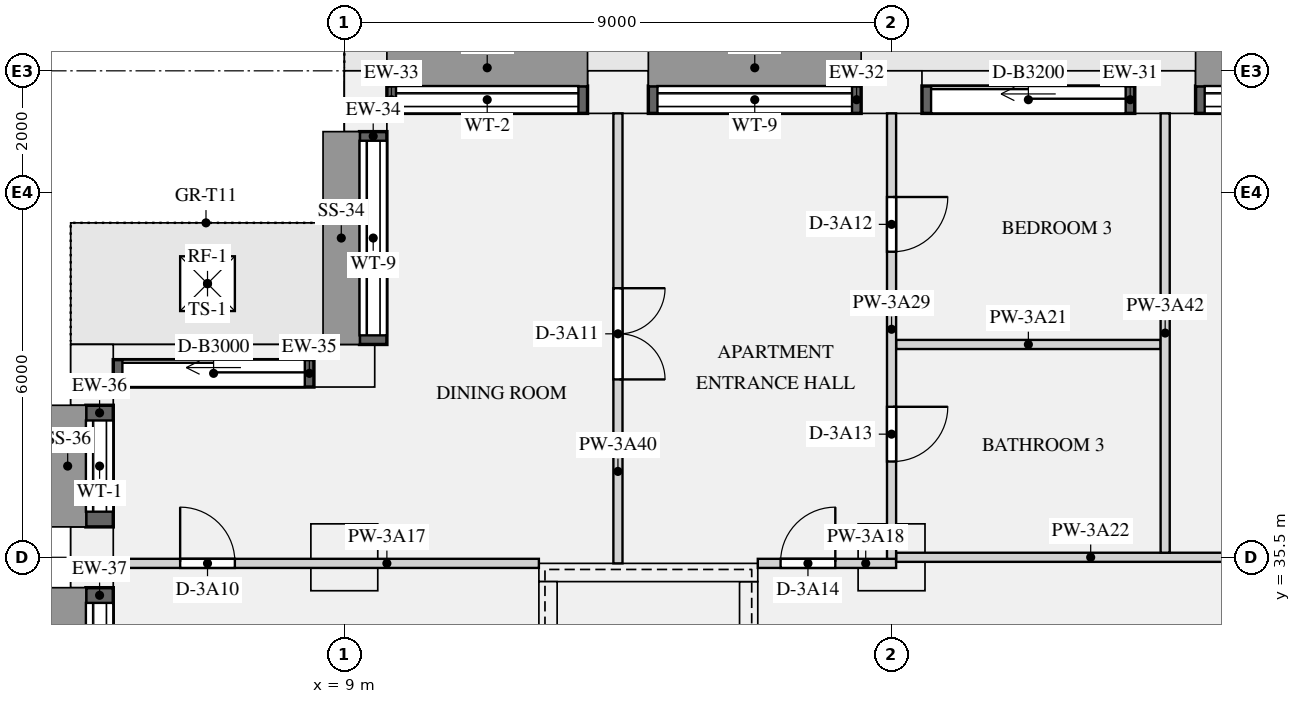
"""IFC4 building model, lengths in metres.
Left out: names, types, materials, properties, quantities, classifications, styles, units other than length and angle.
Written with IfcOpenShell. Run it as: python <this file> out.ifc"""

import sys

from ifc_helpers import new_model, si_unit, direction, frame, frame_2d, origin, origin_2d, place, context, subcontext, project, spatial, rectangle, extrude, element, fill, save


model = new_model("IFC4")
c1 = context("Model", 3, precision=1e-05, world=origin(), true_north=direction((0.0, 1.0)))
c2 = subcontext(c1, "Body", "Model", "MODEL_VIEW")
j1 = project(units=[si_unit("LENGTHUNIT", "METRE"), si_unit("PLANEANGLEUNIT", "RADIAN")], contexts=[c1])
p1 = place(None, origin())
s1 = spatial("IfcSite", under=j1, at=p1, CompositionType="ELEMENT")
p2 = place(p1, origin())
s2 = spatial("IfcBuilding", under=s1, at=p2, CompositionType="ELEMENT")
p3 = place(p2, frame((0.0, 0.0, 141.3)))
s3 = spatial("IfcBuildingStorey", under=s2, at=p3, CompositionType="ELEMENT", Elevation=141.3)
for number, where, z_axis, x_axis in (
    (1, (22.5, 43.15, 0.0), (0.0, 0.0, 1.0), (-1.0, 0.0, 0.0)),
    (2, (18.0, 43.15, 0.0), (0.0, 0.0, 1.0), (-1.0, 0.0, 0.0)),
    (3, (13.5, 43.15, 0.0), (0.0, 0.0, 1.0), (-1.0, 0.0, 0.0)),
    (4, (9.35, 43.0, 0.0), (0.0, 0.0, 1.0), (0.0, -1.0, 0.0)),
    (5, (9.0, 38.65, 0.0), (0.0, 0.0, 1.0), (-1.0, 0.0, 0.0)),
    (6, (4.85, 38.5, 0.0), (0.0, 0.0, 1.0), (0.0, -1.0, 0.0)),
    (7, (4.85, 35.5, 0.0), (0.0, 0.0, 1.0), (0.0, -1.0, 0.0)),
):
    element("IfcColumn", number, at=place(p3, frame(where, z_axis=z_axis, x_axis=x_axis)), inside=s3, PredefinedType="USERDEFINED", context=c2, shape_type="SweptSolid", body=[
        extrude(rectangle(XDim=1.0, YDim=0.7, at=origin_2d()), origin(), (0.0, 0.0, 1.0), 3.15),
    ])
for number, where, z_axis, x_axis in (
    (8, (9.0, 35.5, 0.0), (0.0, 0.0, 1.0), (1.0, 0.0, 0.0)),
    (9, (18.0, 35.5, 0.0), (0.0, 0.0, 1.0), (1.0, 0.0, 0.0)),
):
    element("IfcColumn", number, at=place(p3, frame(where, z_axis=z_axis, x_axis=x_axis)), inside=s3, PredefinedType="COLUMN", context=c2, shape_type="SweptSolid", body=[
        extrude(rectangle(XDim=1.1, YDim=1.1, at=origin_2d()), origin(), (0.0, 0.0, 1.0), 3.15),
    ])
p4 = place(p3, frame((12.2, 35.25, 0.0), z_axis=(0.0, 0.0, 1.0), x_axis=(1.0, 0.0, 0.0)))
e10 = element("IfcWall", 10, at=p4, inside=s3, PredefinedType="SHEAR", context=c2, shape_type="SweptSolid", body=[
    extrude(rectangle(XDim=3.6, YDim=0.3, at=frame_2d((1.8, 0.0))), origin(), (0.0, 0.0, 1.0), 3.15),
])
for number, where, z_axis, x_axis in (
    (11, (12.35, 27.3, 0.0), (0.0, 0.0, 1.0), (0.0, 1.0, 0.0)),
    (12, (15.65, 27.3, 0.0), (0.0, 0.0, 1.0), (0.0, 1.0, 0.0)),
):
    element("IfcWall", number, at=place(p3, frame(where, z_axis=z_axis, x_axis=x_axis)), inside=s3, PredefinedType="SHEAR", context=c2, shape_type="SweptSolid", body=[
        extrude(rectangle(XDim=7.8, YDim=0.3, at=frame_2d((3.9, 0.0))), origin(), (0.0, 0.0, 1.0), 3.15),
    ])
p5 = place(p3, frame((26.5, 43.025, 0.9), z_axis=(0.0, 0.0, 1.0), x_axis=(-1.0, 0.0, 0.0)))
e13 = element("IfcWall", 13, at=p5, inside=s3, PredefinedType="SOLIDWALL", context=c2, shape_type="SweptSolid", body=[
    extrude(rectangle(XDim=3.5, YDim=0.45, at=frame_2d((1.75, 0.0))), origin(), (0.0, 0.0, 1.0), 1.93),
])
p6 = place(p5, frame((0.15, 0.0, 0.15)))
e14 = element("IfcOpeningElement", 14, at=p6, cuts=e13, PredefinedType="OPENING", context=c2, shape_type="SweptSolid", body=[
    extrude(rectangle(XDim=3.2, YDim=1.5, at=frame_2d((1.6, 0.75))), frame((0.0, 0.235, 0.0), z_axis=(0.0, -1.0, 0.0), x_axis=(1.0, 0.0, 0.0)), (0.0, 0.0, 1.0), 0.47),
])
p7 = place(p3, frame((22.0, 43.025, 0.0), z_axis=(0.0, 0.0, 1.0), x_axis=(-1.0, 0.0, 0.0)))
e15 = element("IfcWall", 15, at=p7, inside=s3, PredefinedType="SOLIDWALL", context=c2, shape_type="SweptSolid", body=[
    extrude(rectangle(XDim=3.5, YDim=0.45, at=frame_2d((1.75, 0.0))), origin(), (0.0, 0.0, 1.0), 2.83),
])
p8 = place(p7, frame((0.15, 0.0, 0.0)))
e16 = element("IfcOpeningElement", 16, at=p8, cuts=e15, PredefinedType="OPENING", context=c2, shape_type="SweptSolid", body=[
    extrude(rectangle(XDim=3.2, YDim=2.3, at=frame_2d((1.6, 1.15))), frame((0.0, 0.235, 0.0), z_axis=(0.0, -1.0, 0.0), x_axis=(1.0, 0.0, 0.0)), (0.0, 0.0, 1.0), 0.47),
])
p9 = place(p3, frame((17.5, 43.025, 0.9), z_axis=(0.0, 0.0, 1.0), x_axis=(-1.0, 0.0, 0.0)))
e17 = element("IfcWall", 17, at=p9, inside=s3, PredefinedType="SOLIDWALL", context=c2, shape_type="SweptSolid", body=[
    extrude(rectangle(XDim=3.5, YDim=0.45, at=frame_2d((1.75, 0.0))), origin(), (0.0, 0.0, 1.0), 1.93),
])
p10 = place(p9, frame((0.15, 0.0, 0.15)))
e18 = element("IfcOpeningElement", 18, at=p10, cuts=e17, PredefinedType="OPENING", context=c2, shape_type="SweptSolid", body=[
    extrude(rectangle(XDim=3.2, YDim=1.5, at=frame_2d((1.6, 0.75))), frame((0.0, 0.235, 0.0), z_axis=(0.0, -1.0, 0.0), x_axis=(1.0, 0.0, 0.0)), (0.0, 0.0, 1.0), 0.47),
])
p11 = place(p3, frame((13.0, 43.025, 0.9), z_axis=(0.0, 0.0, 1.0), x_axis=(-1.0, 0.0, 0.0)))
e19 = element("IfcWall", 19, at=p11, inside=s3, PredefinedType="SOLIDWALL", context=c2, shape_type="SweptSolid", body=[
    extrude(rectangle(XDim=3.3, YDim=0.45, at=frame_2d((1.65, 0.0))), origin(), (0.0, 0.0, 1.0), 1.93),
])
p12 = place(p11, frame((0.15, 0.0, 0.15)))
e20 = element("IfcOpeningElement", 20, at=p12, cuts=e19, PredefinedType="OPENING", context=c2, shape_type="SweptSolid", body=[
    extrude(rectangle(XDim=3.0, YDim=1.5, at=frame_2d((1.5, 0.75))), frame((0.0, 0.235, 0.0), z_axis=(0.0, -1.0, 0.0), x_axis=(1.0, 0.0, 0.0)), (0.0, 0.0, 1.0), 0.47),
])
p13 = place(p3, frame((9.475, 42.5, 0.9), z_axis=(0.0, 0.0, 1.0), x_axis=(0.0, -1.0, 0.0)))
e21 = element("IfcWall", 21, at=p13, inside=s3, PredefinedType="SOLIDWALL", context=c2, shape_type="SweptSolid", body=[
    extrude(rectangle(XDim=3.5, YDim=0.45, at=frame_2d((1.75, 0.0))), origin(), (0.0, 0.0, 1.0), 1.93),
])
p14 = place(p13, frame((0.15, 0.0, 0.15)))
e22 = element("IfcOpeningElement", 22, at=p14, cuts=e21, PredefinedType="OPENING", context=c2, shape_type="SweptSolid", body=[
    extrude(rectangle(XDim=3.2, YDim=1.5, at=frame_2d((1.6, 0.75))), frame((0.0, 0.235, 0.0), z_axis=(0.0, -1.0, 0.0), x_axis=(1.0, 0.0, 0.0)), (0.0, 0.0, 1.0), 0.47),
])
p15 = place(p3, frame((8.5, 38.525, 0.0), z_axis=(0.0, 0.0, 1.0), x_axis=(-1.0, 0.0, 0.0)))
e23 = element("IfcWall", 23, at=p15, inside=s3, PredefinedType="SOLIDWALL", context=c2, shape_type="SweptSolid", body=[
    extrude(rectangle(XDim=3.3, YDim=0.45, at=frame_2d((1.65, 0.0))), origin(), (0.0, 0.0, 1.0), 2.83),
])
p16 = place(p15, frame((0.15, 0.0, 0.0)))
e24 = element("IfcOpeningElement", 24, at=p16, cuts=e23, PredefinedType="OPENING", context=c2, shape_type="SweptSolid", body=[
    extrude(rectangle(XDim=3.0, YDim=2.3, at=frame_2d((1.5, 1.15))), frame((0.0, 0.235, 0.0), z_axis=(0.0, -1.0, 0.0), x_axis=(1.0, 0.0, 0.0)), (0.0, 0.0, 1.0), 0.47),
])
p17 = place(p3, frame((4.975, 38.0, 0.9), z_axis=(0.0, 0.0, 1.0), x_axis=(0.0, -1.0, 0.0)))
e25 = element("IfcWall", 25, at=p17, inside=s3, PredefinedType="SOLIDWALL", context=c2, shape_type="SweptSolid", body=[
    extrude(rectangle(XDim=2.0, YDim=0.45, at=frame_2d((1.0, 0.0))), origin(), (0.0, 0.0, 1.0), 1.93),
])
p18 = place(p17, frame((0.25, 0.0, 0.15)))
e26 = element("IfcOpeningElement", 26, at=p18, cuts=e25, PredefinedType="OPENING", context=c2, shape_type="SweptSolid", body=[
    extrude(rectangle(XDim=1.5, YDim=1.5, at=frame_2d((0.75, 0.75))), frame((0.0, 0.235, 0.0), z_axis=(0.0, -1.0, 0.0), x_axis=(1.0, 0.0, 0.0)), (0.0, 0.0, 1.0), 0.47),
])
p19 = place(p3, frame((4.975, 35.0, 0.9), z_axis=(0.0, 0.0, 1.0), x_axis=(0.0, -1.0, 0.0)))
e27 = element("IfcWall", 27, at=p19, inside=s3, PredefinedType="SOLIDWALL", context=c2, shape_type="SweptSolid", body=[
    extrude(rectangle(XDim=2.5, YDim=0.45, at=frame_2d((1.25, 0.0))), origin(), (0.0, 0.0, 1.0), 1.93),
])
p20 = place(p19, frame((0.25, 0.0, 0.15)))
e28 = element("IfcOpeningElement", 28, at=p20, cuts=e27, PredefinedType="OPENING", context=c2, shape_type="SweptSolid", body=[
    extrude(rectangle(XDim=2.0, YDim=1.5, at=frame_2d((1.0, 0.75))), frame((0.0, 0.235, 0.0), z_axis=(0.0, -1.0, 0.0), x_axis=(1.0, 0.0, 0.0)), (0.0, 0.0, 1.0), 0.47),
])
p21 = place(p3, frame((5.2, 35.4, 0.0), z_axis=(0.0, 0.0, 1.0), x_axis=(1.0, 0.0, 0.0)))
e29 = element("IfcWall", 29, at=p21, inside=s3, PredefinedType="PARTITIONING", context=c2, shape_type="SweptSolid", body=[
    extrude(rectangle(XDim=7.0, YDim=0.15, at=frame_2d((3.5, 0.0))), origin(), (0.0, 0.0, 1.0), 2.83),
])
p22 = place(p21, frame((1.1, 0.0, 0.0)))
e30 = element("IfcOpeningElement", 30, at=p22, cuts=e29, PredefinedType="OPENING", context=c2, shape_type="SweptSolid", body=[
    extrude(rectangle(XDim=0.9, YDim=2.1, at=frame_2d((0.45, 1.05))), frame((0.0, 0.085, 0.0), z_axis=(0.0, -1.0, 0.0), x_axis=(1.0, 0.0, 0.0)), (0.0, 0.0, 1.0), 0.17),
])
p23 = place(p3, frame((15.8, 35.4, 0.0), z_axis=(0.0, 0.0, 1.0), x_axis=(1.0, 0.0, 0.0)))
e31 = element("IfcWall", 31, at=p23, inside=s3, PredefinedType="PARTITIONING", context=c2, shape_type="SweptSolid", body=[
    extrude(rectangle(XDim=2.275, YDim=0.15, at=frame_2d((1.137, 0.0))), origin(), (0.0, 0.0, 1.0), 2.83),
])
p24 = place(p23, frame((0.375, 0.0, 0.0)))
e32 = element("IfcOpeningElement", 32, at=p24, cuts=e31, PredefinedType="OPENING", context=c2, shape_type="SweptSolid", body=[
    extrude(rectangle(XDim=0.9, YDim=2.1, at=frame_2d((0.45, 1.05))), frame((0.0, 0.085, 0.0), z_axis=(0.0, -1.0, 0.0), x_axis=(1.0, 0.0, 0.0)), (0.0, 0.0, 1.0), 0.17),
])
p25 = place(p3, frame((18.075, 39.0, 0.0), z_axis=(0.0, 0.0, 1.0), x_axis=(1.0, 0.0, 0.0)))
e33 = element("IfcWall", 33, at=p25, inside=s3, PredefinedType="PARTITIONING", context=c2, shape_type="SweptSolid", body=[
    extrude(rectangle(XDim=4.35, YDim=0.15, at=frame_2d((2.175, 0.0))), origin(), (0.0, 0.0, 1.0), 2.83),
])
p26 = place(p3, frame((18.075, 35.5, 0.0), z_axis=(0.0, 0.0, 1.0), x_axis=(1.0, 0.0, 0.0)))
e34 = element("IfcWall", 34, at=p26, inside=s3, PredefinedType="PARTITIONING", context=c2, shape_type="SweptSolid", body=[
    extrude(rectangle(XDim=8.925, YDim=0.15, at=frame_2d((4.462, 0.0))), origin(), (0.0, 0.0, 1.0), 2.83),
])
p27 = place(p26, frame((6.4, 0.0, 0.0)))
e35 = element("IfcOpeningElement", 35, at=p27, cuts=e34, PredefinedType="OPENING", context=c2, shape_type="SweptSolid", body=[
    extrude(rectangle(XDim=1.5, YDim=2.1, at=frame_2d((0.75, 1.05))), frame((0.0, 0.085, 0.0), z_axis=(0.0, -1.0, 0.0), x_axis=(1.0, 0.0, 0.0)), (0.0, 0.0, 1.0), 0.17),
])
p28 = place(p3, frame((18.0, 35.475, 0.0), z_axis=(0.0, 0.0, 1.0), x_axis=(0.0, 1.0, 0.0)))
e36 = element("IfcWall", 36, at=p28, inside=s3, PredefinedType="PARTITIONING", context=c2, shape_type="SweptSolid", body=[
    extrude(rectangle(XDim=7.325, YDim=0.15, at=frame_2d((3.663, 0.0))), origin(), (0.0, 0.0, 1.0), 2.83),
])
p29 = place(p28, frame((5.05, 0.0, 0.0)))
e37 = element("IfcOpeningElement", 37, at=p29, cuts=e36, PredefinedType="OPENING", context=c2, shape_type="SweptSolid", body=[
    extrude(rectangle(XDim=0.9, YDim=2.1, at=frame_2d((0.45, 1.05))), frame((0.0, 0.085, 0.0), z_axis=(0.0, -1.0, 0.0), x_axis=(1.0, 0.0, 0.0)), (0.0, 0.0, 1.0), 0.17),
])
p30 = place(p28, frame((1.6, 0.0, 0.0)))
e38 = element("IfcOpeningElement", 38, at=p30, cuts=e36, PredefinedType="OPENING", context=c2, shape_type="SweptSolid", body=[
    extrude(rectangle(XDim=0.9, YDim=2.1, at=frame_2d((0.45, 1.05))), frame((0.0, 0.085, 0.0), z_axis=(0.0, -1.0, 0.0), x_axis=(1.0, 0.0, 0.0)), (0.0, 0.0, 1.0), 0.17),
])
p31 = place(p3, frame((13.5, 35.4, 0.0), z_axis=(0.0, 0.0, 1.0), x_axis=(0.0, 1.0, 0.0)))
e39 = element("IfcWall", 39, at=p31, inside=s3, PredefinedType="PARTITIONING", context=c2, shape_type="SweptSolid", body=[
    extrude(rectangle(XDim=7.4, YDim=0.15, at=frame_2d((3.7, 0.0))), origin(), (0.0, 0.0, 1.0), 2.83),
])
p32 = place(p31, frame((3.025, 0.0, 0.0)))
e40 = element("IfcOpeningElement", 40, at=p32, cuts=e39, PredefinedType="OPENING", context=c2, shape_type="SweptSolid", body=[
    extrude(rectangle(XDim=1.5, YDim=2.1, at=frame_2d((0.75, 1.05))), frame((0.0, 0.085, 0.0), z_axis=(0.0, -1.0, 0.0), x_axis=(1.0, 0.0, 0.0)), (0.0, 0.0, 1.0), 0.17),
])
p33 = place(p3, frame((22.5, 35.575, 0.0), z_axis=(0.0, 0.0, 1.0), x_axis=(0.0, 1.0, 0.0)))
e41 = element("IfcWall", 41, at=p33, inside=s3, PredefinedType="PARTITIONING", context=c2, shape_type="SweptSolid", body=[
    extrude(rectangle(XDim=7.225, YDim=0.15, at=frame_2d((3.613, 0.0))), origin(), (0.0, 0.0, 1.0), 2.83),
])
p34 = place(p6, origin())
e42 = element("IfcWindow", 42, at=p34, inside=s3, PartitioningType="SINGLE_PANEL", PredefinedType="WINDOW", context=c2, shape_type="SweptSolid", body=[
    extrude(rectangle(XDim=3.2, YDim=1.5, at=frame_2d((1.6, 0.75))), frame((0.0, -0.065, 0.0), z_axis=(0.0, -1.0, 0.0), x_axis=(1.0, 0.0, 0.0)), (0.0, 0.0, 1.0), 0.06),
])
fill(e14, e42)
p35 = place(p8, origin())
e43 = element("IfcDoor", 43, at=p35, inside=s3, OperationType="SLIDING_TO_LEFT", PredefinedType="DOOR", context=c2, shape_type="SweptSolid", body=[
    extrude(rectangle(XDim=3.2, YDim=2.3, at=frame_2d((1.6, 1.15))), frame((0.0, -0.07, 0.0), z_axis=(0.0, -1.0, 0.0), x_axis=(1.0, 0.0, 0.0)), (0.0, 0.0, 1.0), 0.05),
])
fill(e16, e43)
p36 = place(p10, origin())
e44 = element("IfcWindow", 44, at=p36, inside=s3, PartitioningType="SINGLE_PANEL", PredefinedType="WINDOW", context=c2, shape_type="SweptSolid", body=[
    extrude(rectangle(XDim=3.2, YDim=1.5, at=frame_2d((1.6, 0.75))), frame((0.0, -0.065, 0.0), z_axis=(0.0, -1.0, 0.0), x_axis=(1.0, 0.0, 0.0)), (0.0, 0.0, 1.0), 0.06),
])
fill(e18, e44)
p37 = place(p12, origin())
e45 = element("IfcWindow", 45, at=p37, inside=s3, PartitioningType="SINGLE_PANEL", PredefinedType="WINDOW", context=c2, shape_type="SweptSolid", body=[
    extrude(rectangle(XDim=3.0, YDim=1.5, at=frame_2d((1.5, 0.75))), frame((0.0, -0.065, 0.0), z_axis=(0.0, -1.0, 0.0), x_axis=(1.0, 0.0, 0.0)), (0.0, 0.0, 1.0), 0.06),
])
fill(e20, e45)
p38 = place(p14, origin())
e46 = element("IfcWindow", 46, at=p38, inside=s3, PartitioningType="SINGLE_PANEL", PredefinedType="WINDOW", context=c2, shape_type="SweptSolid", body=[
    extrude(rectangle(XDim=3.2, YDim=1.5, at=frame_2d((1.6, 0.75))), frame((0.0, -0.065, 0.0), z_axis=(0.0, -1.0, 0.0), x_axis=(1.0, 0.0, 0.0)), (0.0, 0.0, 1.0), 0.06),
])
fill(e22, e46)
p39 = place(p16, origin())
e47 = element("IfcDoor", 47, at=p39, inside=s3, OperationType="SLIDING_TO_LEFT", PredefinedType="DOOR", context=c2, shape_type="SweptSolid", body=[
    extrude(rectangle(XDim=3.0, YDim=2.3, at=frame_2d((1.5, 1.15))), frame((0.0, -0.07, 0.0), z_axis=(0.0, -1.0, 0.0), x_axis=(1.0, 0.0, 0.0)), (0.0, 0.0, 1.0), 0.05),
])
fill(e24, e47)
p40 = place(p18, origin())
e48 = element("IfcWindow", 48, at=p40, inside=s3, PartitioningType="SINGLE_PANEL", PredefinedType="WINDOW", context=c2, shape_type="SweptSolid", body=[
    extrude(rectangle(XDim=1.5, YDim=1.5, at=frame_2d((0.75, 0.75))), frame((0.0, -0.065, 0.0), z_axis=(0.0, -1.0, 0.0), x_axis=(1.0, 0.0, 0.0)), (0.0, 0.0, 1.0), 0.06),
])
fill(e26, e48)
p41 = place(p20, origin())
e49 = element("IfcWindow", 49, at=p41, inside=s3, PartitioningType="SINGLE_PANEL", PredefinedType="WINDOW", context=c2, shape_type="SweptSolid", body=[
    extrude(rectangle(XDim=2.0, YDim=1.5, at=frame_2d((1.0, 0.75))), frame((0.0, -0.065, 0.0), z_axis=(0.0, -1.0, 0.0), x_axis=(1.0, 0.0, 0.0)), (0.0, 0.0, 1.0), 0.06),
])
fill(e28, e49)
p42 = place(p3, frame((0.0, 0.0, -0.34)))
p43 = place(p42, frame((6.75, 40.0, 0.0)))
p44 = place(p43, frame((0.0, 0.0, 0.25)))
e50 = element("IfcWindow", 50, at=p44, inside=s3, PartitioningType="SINGLE_PANEL", PredefinedType="SKYLIGHT", context=c2, shape_type="SweptSolid", body=[
    extrude(rectangle(XDim=0.9, YDim=0.9, at=origin_2d()), origin(), (0.0, 0.0, 1.0), 0.05),
])
p45 = place(p22, origin())
e51 = element("IfcDoor", 51, at=p45, inside=s3, OperationType="SINGLE_SWING_LEFT", PredefinedType="DOOR", context=c2, shape_type="SweptSolid", body=[
    extrude(rectangle(XDim=0.9, YDim=2.1, at=frame_2d((0.45, 1.05))), frame((0.0, 0.025, 0.0), z_axis=(0.0, -1.0, 0.0), x_axis=(1.0, 0.0, 0.0)), (0.0, 0.0, 1.0), 0.05),
])
fill(e30, e51)
p46 = place(p32, frame((1.5, 0.0, 0.0), z_axis=(0.0, 0.0, 1.0), x_axis=(-1.0, 0.0, 0.0)))
e52 = element("IfcDoor", 52, at=p46, inside=s3, OperationType="DOUBLE_DOOR_SINGLE_SWING", PredefinedType="DOOR", context=c2, shape_type="SweptSolid", body=[
    extrude(rectangle(XDim=1.5, YDim=2.1, at=frame_2d((0.75, 1.05))), frame((0.0, 0.025, 0.0), z_axis=(0.0, -1.0, 0.0), x_axis=(1.0, 0.0, 0.0)), (0.0, 0.0, 1.0), 0.05),
])
fill(e40, e52)
p47 = place(p29, frame((0.9, 0.0, 0.0), z_axis=(0.0, 0.0, 1.0), x_axis=(-1.0, 0.0, 0.0)))
e53 = element("IfcDoor", 53, at=p47, inside=s3, OperationType="SINGLE_SWING_LEFT", PredefinedType="DOOR", context=c2, shape_type="SweptSolid", body=[
    extrude(rectangle(XDim=0.9, YDim=2.1, at=frame_2d((0.45, 1.05))), frame((0.0, 0.025, 0.0), z_axis=(0.0, -1.0, 0.0), x_axis=(1.0, 0.0, 0.0)), (0.0, 0.0, 1.0), 0.05),
])
fill(e37, e53)
p48 = place(p30, frame((0.9, 0.0, 0.0), z_axis=(0.0, 0.0, 1.0), x_axis=(-1.0, 0.0, 0.0)))
e54 = element("IfcDoor", 54, at=p48, inside=s3, OperationType="SINGLE_SWING_LEFT", PredefinedType="DOOR", context=c2, shape_type="SweptSolid", body=[
    extrude(rectangle(XDim=0.9, YDim=2.1, at=frame_2d((0.45, 1.05))), frame((0.0, 0.025, 0.0), z_axis=(0.0, -1.0, 0.0), x_axis=(1.0, 0.0, 0.0)), (0.0, 0.0, 1.0), 0.05),
])
fill(e38, e54)
p49 = place(p24, origin())
e55 = element("IfcDoor", 55, at=p49, inside=s3, OperationType="SINGLE_SWING_RIGHT", PredefinedType="DOOR", context=c2, shape_type="SweptSolid", body=[
    extrude(rectangle(XDim=0.9, YDim=2.1, at=frame_2d((0.45, 1.05))), frame((0.0, 0.025, 0.0), z_axis=(0.0, -1.0, 0.0), x_axis=(1.0, 0.0, 0.0)), (0.0, 0.0, 1.0), 0.05),
])
fill(e32, e55)
save(model, sys.argv[1])
